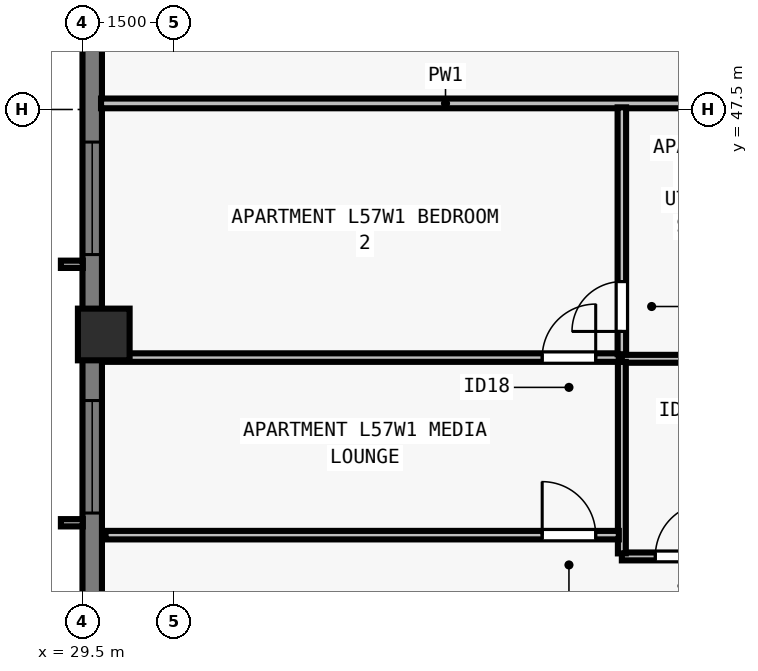
"""IFC4 building model, lengths in metres.
Left out: names, types, materials, properties, quantities, classifications, styles, units other than length and angle.
Written with IfcOpenShell. Run it as: python <this file> out.ifc"""

import sys

from ifc_helpers import new_model, si_unit, direction, frame, frame_2d, origin, origin_2d, place, context, subcontext, project, spatial, rectangle, extrude, element, fill, save


model = new_model("IFC4")
c1 = context("Model", 3, precision=1e-05, world=origin(), true_north=direction((0.0, 1.0)))
c2 = subcontext(c1, "Body", "Model", "MODEL_VIEW")
j1 = project(units=[si_unit("LENGTHUNIT", "METRE"), si_unit("PLANEANGLEUNIT", "RADIAN")], contexts=[c1])
p1 = place(None, origin())
s1 = spatial("IfcSite", under=j1, at=p1, CompositionType="ELEMENT")
p2 = place(p1, origin())
s2 = spatial("IfcBuilding", under=s1, at=p2, CompositionType="ELEMENT")
p3 = place(p2, frame((0.0, 0.0, 209.5)))
s3 = spatial("IfcBuildingStorey", under=s2, at=p3, CompositionType="ELEMENT", Elevation=209.5)
p4 = place(p3, frame((29.85, 43.8, 0.0), z_axis=(0.0, 0.0, 1.0), x_axis=(0.0, 1.0, 0.0)))
e1 = element("IfcColumn", 1, at=p4, inside=s3, PredefinedType="COLUMN", context=c2, shape_type="SweptSolid", body=[
    extrude(rectangle(XDim=0.85, YDim=0.85, at=origin_2d()), origin(), (0.0, 0.0, 1.0), 3.5),
])
p5 = place(p3, frame((29.66, 21.5, 0.0), z_axis=(0.0, 0.0, 1.0), x_axis=(0.0, 1.0, 0.0)))
e2 = element("IfcWall", 2, at=p5, inside=s3, PredefinedType="SOLIDWALL", context=c2, shape_type="SweptSolid", body=[
    extrude(rectangle(XDim=34.702, YDim=0.32, at=frame_2d((17.351, 0.0))), origin(), (0.0, 0.0, 1.0), 3.29),
])
p6 = place(p5, frame((4.163, 0.0, 0.8)))
e3 = element("IfcOpeningElement", 3, at=p6, cuts=e2, PredefinedType="OPENING", context=c2, shape_type="SweptSolid", body=[
    extrude(rectangle(XDim=1.85, YDim=1.678, at=frame_2d((0.925, 0.839))), frame((0.0, 0.17, 0.0), z_axis=(0.0, -1.0, 0.0), x_axis=(1.0, 0.0, 0.0)), (0.0, 0.0, 1.0), 0.34),
])
p7 = place(p5, frame((6.888, 0.0, 0.8)))
e4 = element("IfcOpeningElement", 4, at=p7, cuts=e2, PredefinedType="OPENING", context=c2, shape_type="SweptSolid", body=[
    extrude(rectangle(XDim=1.55, YDim=1.678, at=frame_2d((0.775, 0.839))), frame((0.0, 0.17, 0.0), z_axis=(0.0, -1.0, 0.0), x_axis=(1.0, 0.0, 0.0)), (0.0, 0.0, 1.0), 0.34),
])
p8 = place(p5, frame((10.113, 0.0, 0.8)))
e5 = element("IfcOpeningElement", 5, at=p8, cuts=e2, PredefinedType="OPENING", context=c2, shape_type="SweptSolid", body=[
    extrude(rectangle(XDim=1.85, YDim=1.678, at=frame_2d((0.925, 0.839))), frame((0.0, 0.17, 0.0), z_axis=(0.0, -1.0, 0.0), x_axis=(1.0, 0.0, 0.0)), (0.0, 0.0, 1.0), 0.34),
])
p9 = place(p5, frame((14.888, 0.0, 0.8)))
e6 = element("IfcOpeningElement", 6, at=p9, cuts=e2, PredefinedType="OPENING", context=c2, shape_type="SweptSolid", body=[
    extrude(rectangle(XDim=1.55, YDim=1.678, at=frame_2d((0.775, 0.839))), frame((0.0, 0.17, 0.0), z_axis=(0.0, -1.0, 0.0), x_axis=(1.0, 0.0, 0.0)), (0.0, 0.0, 1.0), 0.34),
])
p10 = place(p5, frame((19.364, 0.0, 0.8)))
e7 = element("IfcOpeningElement", 7, at=p10, cuts=e2, PredefinedType="OPENING", context=c2, shape_type="SweptSolid", body=[
    extrude(rectangle(XDim=1.85, YDim=1.678, at=frame_2d((0.925, 0.839))), frame((0.0, 0.17, 0.0), z_axis=(0.0, -1.0, 0.0), x_axis=(1.0, 0.0, 0.0)), (0.0, 0.0, 1.0), 0.34),
])
p11 = place(p5, frame((23.614, 0.0, 0.8)))
e8 = element("IfcOpeningElement", 8, at=p11, cuts=e2, PredefinedType="OPENING", context=c2, shape_type="SweptSolid", body=[
    extrude(rectangle(XDim=1.85, YDim=1.678, at=frame_2d((0.925, 0.839))), frame((0.0, 0.17, 0.0), z_axis=(0.0, -1.0, 0.0), x_axis=(1.0, 0.0, 0.0)), (0.0, 0.0, 1.0), 0.34),
])
p12 = place(p5, frame((28.839, 0.0, 0.8)))
e9 = element("IfcOpeningElement", 9, at=p12, cuts=e2, PredefinedType="OPENING", context=c2, shape_type="SweptSolid", body=[
    extrude(rectangle(XDim=1.55, YDim=1.678, at=frame_2d((0.775, 0.839))), frame((0.0, 0.17, 0.0), z_axis=(0.0, -1.0, 0.0), x_axis=(1.0, 0.0, 0.0)), (0.0, 0.0, 1.0), 0.34),
])
p13 = place(p3, frame((29.805, 47.6, 0.0), z_axis=(0.0, 0.0, 1.0), x_axis=(1.0, 0.0, 0.0)))
e10 = element("IfcWall", 10, at=p13, inside=s3, PredefinedType="PARTITIONING", context=c2, shape_type="SweptSolid", body=[
    extrude(rectangle(XDim=11.33, YDim=0.16, at=frame_2d((5.665, 0.0))), origin(), (0.0, 0.0, 1.0), 3.29),
])
p14 = place(p3, frame((38.37, 43.4, 0.0), z_axis=(0.0, 0.0, 1.0), x_axis=(1.0, 0.0, 0.0)))
e11 = element("IfcWall", 11, at=p14, inside=s3, PredefinedType="PLUMBINGWALL", context=c2, shape_type="SweptSolid", body=[
    extrude(rectangle(XDim=2.75, YDim=0.13, at=frame_2d((1.375, 0.0))), origin(), (0.0, 0.0, 1.0), 2.958),
])
p15 = place(p3, frame((38.37, 40.15, 0.0), z_axis=(0.0, 0.0, 1.0), x_axis=(1.0, 0.0, 0.0)))
e12 = element("IfcWall", 12, at=p15, inside=s3, PredefinedType="PLUMBINGWALL", context=c2, shape_type="SweptSolid", body=[
    extrude(rectangle(XDim=2.75, YDim=0.13, at=frame_2d((1.375, 0.0))), origin(), (0.0, 0.0, 1.0), 3.29),
])
p16 = place(p15, frame((0.55, 0.0, 0.0)))
e13 = element("IfcOpeningElement", 13, at=p16, cuts=e12, PredefinedType="OPENING", context=c2, shape_type="SweptSolid", body=[
    extrude(rectangle(XDim=0.88, YDim=2.1, at=frame_2d((0.44, 1.05))), frame((0.0, 0.075, 0.0), z_axis=(0.0, -1.0, 0.0), x_axis=(1.0, 0.0, 0.0)), (0.0, 0.0, 1.0), 0.15),
])
p17 = place(p3, frame((38.37, 40.2, 0.0), z_axis=(0.0, 0.0, 1.0), x_axis=(0.0, 1.0, 0.0)))
e14 = element("IfcWall", 14, at=p17, inside=s3, PredefinedType="PLUMBINGWALL", context=c2, shape_type="SweptSolid", body=[
    extrude(rectangle(XDim=3.15, YDim=0.13, at=frame_2d((1.575, 0.0))), origin(), (0.0, 0.0, 1.0), 3.29),
])
p18 = place(p3, frame((29.88, 43.42, 0.0), z_axis=(0.0, 0.0, 1.0), x_axis=(1.0, 0.0, 0.0)))
e15 = element("IfcWall", 15, at=p18, inside=s3, PredefinedType="PARTITIONING", context=c2, shape_type="SweptSolid", body=[
    extrude(rectangle(XDim=8.44, YDim=0.14, at=frame_2d((4.22, 0.0))), origin(), (0.0, 0.0, 1.0), 3.29),
])
p19 = place(p18, frame((7.18, 0.0, 0.0)))
e16 = element("IfcOpeningElement", 16, at=p19, cuts=e15, PredefinedType="OPENING", context=c2, shape_type="SweptSolid", body=[
    extrude(rectangle(XDim=0.88, YDim=2.1, at=frame_2d((0.44, 1.05))), frame((0.0, 0.08, 0.0), z_axis=(0.0, -1.0, 0.0), x_axis=(1.0, 0.0, 0.0)), (0.0, 0.0, 1.0), 0.16),
])
p20 = place(p3, frame((38.37, 43.475, 0.0), z_axis=(0.0, 0.0, 1.0), x_axis=(0.0, 1.0, 0.0)))
e17 = element("IfcWall", 17, at=p20, inside=s3, PredefinedType="PARTITIONING", context=c2, shape_type="SweptSolid", body=[
    extrude(rectangle(XDim=4.06, YDim=0.14, at=frame_2d((2.03, 0.0))), origin(), (0.0, 0.0, 1.0), 3.29),
])
p21 = place(p20, frame((0.375, 0.0, 0.0)))
e18 = element("IfcOpeningElement", 18, at=p21, cuts=e17, PredefinedType="OPENING", context=c2, shape_type="SweptSolid", body=[
    extrude(rectangle(XDim=0.82, YDim=2.1, at=frame_2d((0.41, 1.05))), frame((0.0, 0.08, 0.0), z_axis=(0.0, -1.0, 0.0), x_axis=(1.0, 0.0, 0.0)), (0.0, 0.0, 1.0), 0.16),
])
p22 = place(p3, frame((29.88, 40.5, 0.0), z_axis=(0.0, 0.0, 1.0), x_axis=(1.0, 0.0, 0.0)))
e19 = element("IfcWall", 19, at=p22, inside=s3, PredefinedType="PARTITIONING", context=c2, shape_type="SweptSolid", body=[
    extrude(rectangle(XDim=8.44, YDim=0.14, at=frame_2d((4.22, 0.0))), origin(), (0.0, 0.0, 1.0), 2.958),
])
p23 = place(p22, frame((7.18, 0.0, 0.0)))
e20 = element("IfcOpeningElement", 20, at=p23, cuts=e19, PredefinedType="OPENING", context=c2, shape_type="SweptSolid", body=[
    extrude(rectangle(XDim=0.88, YDim=2.1, at=frame_2d((0.44, 1.05))), frame((0.0, 0.08, 0.0), z_axis=(0.0, -1.0, 0.0), x_axis=(1.0, 0.0, 0.0)), (0.0, 0.0, 1.0), 0.16),
])
p24 = place(p10, origin())
e21 = element("IfcWindow", 21, at=p24, inside=s3, PartitioningType="SINGLE_PANEL", PredefinedType="WINDOW", context=c2, shape_type="SweptSolid", body=[
    extrude(rectangle(XDim=1.85, YDim=1.678, at=frame_2d((0.925, 0.839))), frame((0.0, -0.05, 0.0), z_axis=(0.0, -1.0, 0.0), x_axis=(1.0, 0.0, 0.0)), (0.0, 0.0, 1.0), 0.06),
])
fill(e7, e21)
p25 = place(p11, origin())
e22 = element("IfcWindow", 22, at=p25, inside=s3, PartitioningType="SINGLE_PANEL", PredefinedType="WINDOW", context=c2, shape_type="SweptSolid", body=[
    extrude(rectangle(XDim=1.85, YDim=1.678, at=frame_2d((0.925, 0.839))), frame((0.0, -0.05, 0.0), z_axis=(0.0, -1.0, 0.0), x_axis=(1.0, 0.0, 0.0)), (0.0, 0.0, 1.0), 0.06),
])
fill(e8, e22)
p26 = place(p16, origin())
e23 = element("IfcDoor", 23, at=p26, inside=s3, OperationType="SINGLE_SWING_RIGHT", PredefinedType="DOOR", context=c2, shape_type="SweptSolid", body=[
    extrude(rectangle(XDim=0.88, YDim=2.1, at=frame_2d((0.44, 1.05))), frame((0.0, 0.025, 0.0), z_axis=(0.0, -1.0, 0.0), x_axis=(1.0, 0.0, 0.0)), (0.0, 0.0, 1.0), 0.05),
])
fill(e13, e23)
p27 = place(p21, origin())
e24 = element("IfcDoor", 24, at=p27, inside=s3, OperationType="SINGLE_SWING_LEFT", PredefinedType="DOOR", context=c2, shape_type="SweptSolid", body=[
    extrude(rectangle(XDim=0.82, YDim=2.1, at=frame_2d((0.41, 1.05))), frame((0.0, 0.025, 0.0), z_axis=(0.0, -1.0, 0.0), x_axis=(1.0, 0.0, 0.0)), (0.0, 0.0, 1.0), 0.05),
])
fill(e18, e24)
p28 = place(p19, origin())
e25 = element("IfcDoor", 25, at=p28, inside=s3, OperationType="SINGLE_SWING_RIGHT", PredefinedType="DOOR", context=c2, shape_type="SweptSolid", body=[
    extrude(rectangle(XDim=0.88, YDim=2.1, at=frame_2d((0.44, 1.05))), frame((0.0, 0.025, 0.0), z_axis=(0.0, -1.0, 0.0), x_axis=(1.0, 0.0, 0.0)), (0.0, 0.0, 1.0), 0.05),
])
fill(e16, e25)
p29 = place(p23, origin())
e26 = element("IfcDoor", 26, at=p29, inside=s3, OperationType="SINGLE_SWING_LEFT", PredefinedType="DOOR", context=c2, shape_type="SweptSolid", body=[
    extrude(rectangle(XDim=0.88, YDim=2.1, at=frame_2d((0.44, 1.05))), frame((0.0, 0.025, 0.0), z_axis=(0.0, -1.0, 0.0), x_axis=(1.0, 0.0, 0.0)), (0.0, 0.0, 1.0), 0.05),
])
fill(e20, e26)
save(model, sys.argv[1])
